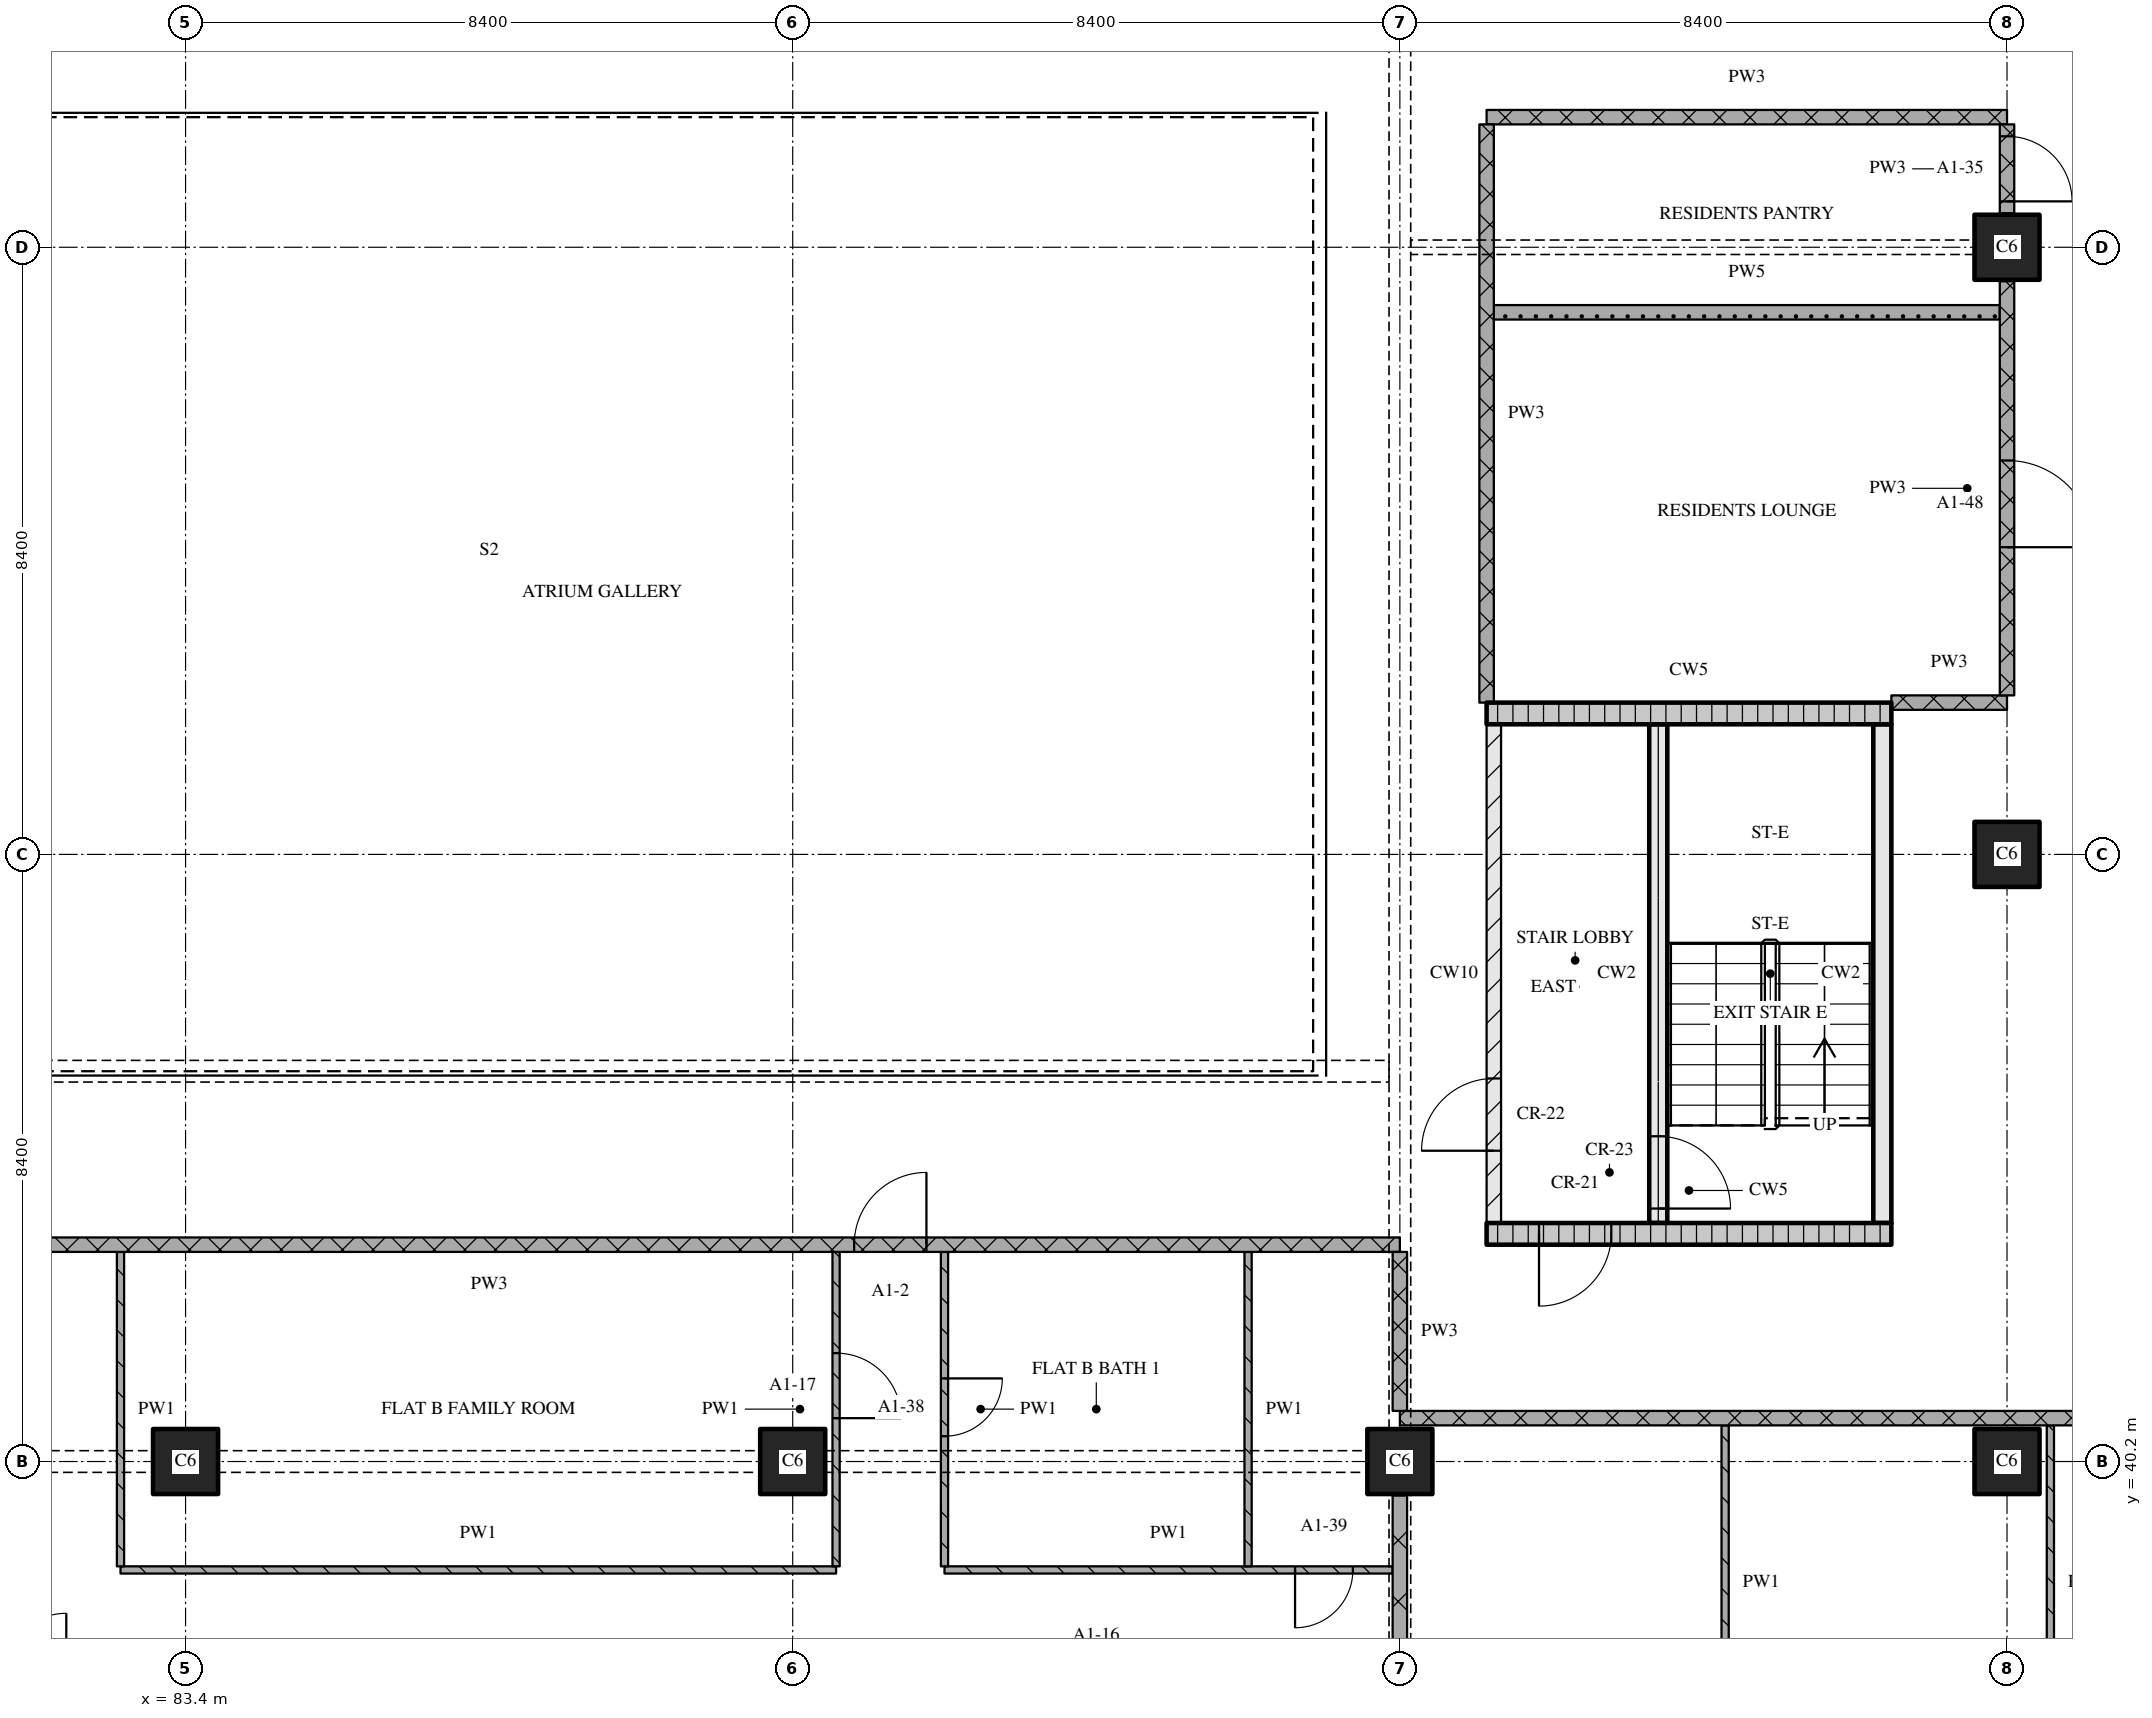
"""IFC4 building model, lengths in metres.
Left out: names, types, materials, properties, quantities, classifications, styles, units other than length and angle.
Written with IfcOpenShell. Run it as: python <this file> out.ifc"""

import sys

from ifc_helpers import new_model, si_unit, direction, frame, frame_2d, origin, origin_2d, place, context, subcontext, project, spatial, rectangle, extrude, element, fill, save


model = new_model("IFC4")
c1 = context("Model", 3, precision=1e-05, world=origin(), true_north=direction((0.0, 1.0)))
c2 = subcontext(c1, "Body", "Model", "MODEL_VIEW")
j1 = project(units=[si_unit("LENGTHUNIT", "METRE"), si_unit("PLANEANGLEUNIT", "RADIAN")], contexts=[c1])
p1 = place(None, origin())
s1 = spatial("IfcSite", under=j1, at=p1, CompositionType="ELEMENT")
p2 = place(p1, origin())
s2 = spatial("IfcBuilding", under=s1, at=p2, CompositionType="ELEMENT")
p3 = place(p2, frame((0.0, 0.0, 40.8)))
s3 = spatial("IfcBuildingStorey", under=s2, at=p3, CompositionType="ELEMENT", Elevation=40.8)
for number, where, z_axis, x_axis in (
    (1, (83.4, 40.2, 0.0), (0.0, 0.0, 1.0), (1.0, 0.0, 0.0)),
    (2, (91.8, 40.2, 0.0), (0.0, 0.0, 1.0), (1.0, 0.0, 0.0)),
    (3, (100.2, 40.2, 0.0), (0.0, 0.0, 1.0), (1.0, 0.0, 0.0)),
    (4, (108.6, 40.2, 0.0), (0.0, 0.0, 1.0), (1.0, 0.0, 0.0)),
    (5, (108.6, 48.6, 0.0), (0.0, 0.0, 1.0), (1.0, 0.0, 0.0)),
    (6, (108.6, 57.0, 0.0), (0.0, 0.0, 1.0), (1.0, 0.0, 0.0)),
):
    element("IfcColumn", number, at=place(p3, frame(where, z_axis=z_axis, x_axis=x_axis)), inside=s3, PredefinedType="COLUMN", context=c2, shape_type="SweptSolid", body=[
        extrude(rectangle(XDim=0.9, YDim=0.9, at=origin_2d()), origin(), (0.0, 0.0, 1.0), 3.6),
    ])
p4 = place(p3, frame((101.4, 43.35, 0.0), z_axis=(0.0, 0.0, 1.0), x_axis=(1.0, 0.0, 0.0)))
e7 = element("IfcWall", 7, at=p4, inside=s3, PredefinedType="SOLIDWALL", context=c2, shape_type="SweptSolid", body=[
    extrude(rectangle(XDim=5.6, YDim=0.3, at=frame_2d((2.8, 0.0))), origin(), (0.0, 0.0, 1.0), 3.32),
])
p5 = place(p4, frame((0.725, 0.0, 0.0)))
e8 = element("IfcOpeningElement", 8, at=p5, cuts=e7, PredefinedType="OPENING", context=c2, shape_type="SweptSolid", body=[
    extrude(rectangle(XDim=1.0, YDim=2.1, at=frame_2d((0.5, 1.05))), frame((0.0, 0.16, 0.0), z_axis=(0.0, -1.0, 0.0), x_axis=(1.0, 0.0, 0.0)), (0.0, 0.0, 1.0), 0.32),
])
p6 = place(p3, frame((101.5, 43.5, 0.0), z_axis=(0.0, 0.0, 1.0), x_axis=(0.0, 1.0, 0.0)))
e9 = element("IfcWall", 9, at=p6, inside=s3, PredefinedType="PARTITIONING", context=c2, shape_type="SweptSolid", body=[
    extrude(rectangle(XDim=6.9, YDim=0.2, at=frame_2d((3.45, 0.0))), origin(), (0.0, 0.0, 1.0), 3.32),
])
p7 = place(p6, frame((1.0, 0.0, 0.0)))
e10 = element("IfcOpeningElement", 10, at=p7, cuts=e9, PredefinedType="OPENING", context=c2, shape_type="SweptSolid", body=[
    extrude(rectangle(XDim=1.0, YDim=2.1, at=frame_2d((0.5, 1.05))), frame((0.0, 0.11, 0.0), z_axis=(0.0, -1.0, 0.0), x_axis=(1.0, 0.0, 0.0)), (0.0, 0.0, 1.0), 0.22),
])
p8 = place(p3, frame((103.775, 43.5, 0.0), z_axis=(0.0, 0.0, 1.0), x_axis=(0.0, 1.0, 0.0)))
e11 = element("IfcWall", 11, at=p8, inside=s3, PredefinedType="SOLIDWALL", context=c2, shape_type="SweptSolid", body=[
    extrude(rectangle(XDim=6.9, YDim=0.25, at=frame_2d((3.45, 0.0))), origin(), (0.0, 0.0, 1.0), 3.32),
])
p9 = place(p8, frame((0.2, 0.0, 0.0)))
e12 = element("IfcOpeningElement", 12, at=p9, cuts=e11, PredefinedType="OPENING", context=c2, shape_type="SweptSolid", body=[
    extrude(rectangle(XDim=1.0, YDim=2.1, at=frame_2d((0.5, 1.05))), frame((0.0, 0.135, 0.0), z_axis=(0.0, -1.0, 0.0), x_axis=(1.0, 0.0, 0.0)), (0.0, 0.0, 1.0), 0.27),
])
p10 = place(p3, frame((106.875, 43.5, 0.0), z_axis=(0.0, 0.0, 1.0), x_axis=(0.0, 1.0, 0.0)))
e13 = element("IfcWall", 13, at=p10, inside=s3, PredefinedType="SOLIDWALL", context=c2, shape_type="SweptSolid", body=[
    extrude(rectangle(XDim=6.9, YDim=0.25, at=frame_2d((3.45, 0.0))), origin(), (0.0, 0.0, 1.0), 3.32),
])
p11 = place(p3, frame((101.4, 50.55, 0.0), z_axis=(0.0, 0.0, 1.0), x_axis=(1.0, 0.0, 0.0)))
e14 = element("IfcWall", 14, at=p11, inside=s3, PredefinedType="SOLIDWALL", context=c2, shape_type="SweptSolid", body=[
    extrude(rectangle(XDim=5.6, YDim=0.3, at=frame_2d((2.8, 0.0))), origin(), (0.0, 0.0, 1.0), 3.32),
])
p12 = place(p3, frame((82.5, 38.7, 0.0), z_axis=(0.0, 0.0, 1.0), x_axis=(1.0, 0.0, 0.0)))
e15 = element("IfcWall", 15, at=p12, inside=s3, PredefinedType="PARTITIONING", context=c2, shape_type="SweptSolid", body=[
    extrude(rectangle(XDim=9.9, YDim=0.1, at=frame_2d((4.95, 0.0))), origin(), (0.0, 0.0, 1.0), 3.32),
])
p13 = place(p3, frame((93.9, 38.7, 0.0), z_axis=(0.0, 0.0, 1.0), x_axis=(1.0, 0.0, 0.0)))
e16 = element("IfcWall", 16, at=p13, inside=s3, PredefinedType="PARTITIONING", context=c2, shape_type="SweptSolid", body=[
    extrude(rectangle(XDim=6.2, YDim=0.1, at=frame_2d((3.1, 0.0))), origin(), (0.0, 0.0, 1.0), 3.32),
])
p14 = place(p13, frame((4.85, 0.0, 0.0)))
e17 = element("IfcOpeningElement", 17, at=p14, cuts=e16, PredefinedType="OPENING", context=c2, shape_type="SweptSolid", body=[
    extrude(rectangle(XDim=0.8, YDim=2.1, at=frame_2d((0.4, 1.05))), frame((0.0, 0.06, 0.0), z_axis=(0.0, -1.0, 0.0), x_axis=(1.0, 0.0, 0.0)), (0.0, 0.0, 1.0), 0.12),
])
p15 = place(p3, frame((124.28, 40.8, 0.0), z_axis=(0.0, 0.0, 1.0), x_axis=(-1.0, 0.0, 0.0)))
e18 = element("IfcWall", 18, at=p15, inside=s3, PredefinedType="PARTITIONING", context=c2, shape_type="SweptSolid", body=[
    extrude(rectangle(XDim=24.08, YDim=0.2, at=frame_2d((12.04, 0.0))), origin(), (0.0, 0.0, 1.0), 3.32),
])
p16 = place(p15, frame((11.73, 0.0, 0.0)))
e19 = element("IfcOpeningElement", 19, at=p16, cuts=e18, PredefinedType="OPENING", context=c2, shape_type="SweptSolid", body=[
    extrude(rectangle(XDim=1.0, YDim=2.1, at=frame_2d((0.5, 1.05))), frame((0.0, 0.11, 0.0), z_axis=(0.0, -1.0, 0.0), x_axis=(1.0, 0.0, 0.0)), (0.0, 0.0, 1.0), 0.22),
])
p17 = place(p3, frame((100.2, 43.2, 0.0), z_axis=(0.0, 0.0, 1.0), x_axis=(-1.0, 0.0, 0.0)))
e20 = element("IfcWall", 20, at=p17, inside=s3, PredefinedType="PARTITIONING", context=c2, shape_type="SweptSolid", body=[
    extrude(rectangle(XDim=25.2, YDim=0.2, at=frame_2d((12.6, 0.0))), origin(), (0.0, 0.0, 1.0), 3.32),
])
p18 = place(p17, frame((6.55, 0.0, 0.0)))
e21 = element("IfcOpeningElement", 21, at=p18, cuts=e20, PredefinedType="OPENING", context=c2, shape_type="SweptSolid", body=[
    extrude(rectangle(XDim=1.0, YDim=2.1, at=frame_2d((0.5, 1.05))), frame((0.0, 0.11, 0.0), z_axis=(0.0, -1.0, 0.0), x_axis=(1.0, 0.0, 0.0)), (0.0, 0.0, 1.0), 0.22),
])
p19 = place(p3, frame((107.0, 50.7, 0.0), z_axis=(0.0, 0.0, 1.0), x_axis=(1.0, 0.0, 0.0)))
e22 = element("IfcWall", 22, at=p19, inside=s3, PredefinedType="PARTITIONING", context=c2, shape_type="SweptSolid", body=[
    extrude(rectangle(XDim=1.6, YDim=0.2, at=frame_2d((0.8, 0.0))), origin(), (0.0, 0.0, 1.0), 3.32),
])
p20 = place(p3, frame((101.5, 56.1, 0.0), z_axis=(0.0, 0.0, 1.0), x_axis=(1.0, 0.0, 0.0)))
e23 = element("IfcWall", 23, at=p20, inside=s3, PredefinedType="PARTITIONING", context=c2, shape_type="SweptSolid", body=[
    extrude(rectangle(XDim=7.0, YDim=0.2, at=frame_2d((3.5, 0.0))), origin(), (0.0, 0.0, 1.0), 3.32),
])
p21 = place(p3, frame((101.4, 58.8, 0.0), z_axis=(0.0, 0.0, 1.0), x_axis=(1.0, 0.0, 0.0)))
e24 = element("IfcWall", 24, at=p21, inside=s3, PredefinedType="PARTITIONING", context=c2, shape_type="SweptSolid", body=[
    extrude(rectangle(XDim=7.2, YDim=0.2, at=frame_2d((3.6, 0.0))), origin(), (0.0, 0.0, 1.0), 3.32),
])
p22 = place(p3, frame((82.5, 43.1, 0.0), z_axis=(0.0, 0.0, 1.0), x_axis=(0.0, -1.0, 0.0)))
e25 = element("IfcWall", 25, at=p22, inside=s3, PredefinedType="PARTITIONING", context=c2, shape_type="SweptSolid", body=[
    extrude(rectangle(XDim=4.35, YDim=0.1, at=frame_2d((2.175, 0.0))), origin(), (0.0, 0.0, 1.0), 3.32),
])
p23 = place(p3, frame((92.4, 38.75, 0.0), z_axis=(0.0, 0.0, 1.0), x_axis=(0.0, 1.0, 0.0)))
e26 = element("IfcWall", 26, at=p23, inside=s3, PredefinedType="PARTITIONING", context=c2, shape_type="SweptSolid", body=[
    extrude(rectangle(XDim=4.35, YDim=0.1, at=frame_2d((2.175, 0.0))), origin(), (0.0, 0.0, 1.0), 3.32),
])
p24 = place(p23, frame((2.05, 0.0, 0.0)))
e27 = element("IfcOpeningElement", 27, at=p24, cuts=e26, PredefinedType="OPENING", context=c2, shape_type="SweptSolid", body=[
    extrude(rectangle(XDim=0.9, YDim=2.1, at=frame_2d((0.45, 1.05))), frame((0.0, 0.06, 0.0), z_axis=(0.0, -1.0, 0.0), x_axis=(1.0, 0.0, 0.0)), (0.0, 0.0, 1.0), 0.12),
])
p25 = place(p3, frame((93.9, 43.1, 0.0), z_axis=(0.0, 0.0, 1.0), x_axis=(0.0, -1.0, 0.0)))
e28 = element("IfcWall", 28, at=p25, inside=s3, PredefinedType="PARTITIONING", context=c2, shape_type="SweptSolid", body=[
    extrude(rectangle(XDim=4.35, YDim=0.1, at=frame_2d((2.175, 0.0))), origin(), (0.0, 0.0, 1.0), 3.32),
])
p26 = place(p25, frame((1.75, 0.0, 0.0)))
e29 = element("IfcOpeningElement", 29, at=p26, cuts=e28, PredefinedType="OPENING", context=c2, shape_type="SweptSolid", body=[
    extrude(rectangle(XDim=0.8, YDim=2.1, at=frame_2d((0.4, 1.05))), frame((0.0, 0.06, 0.0), z_axis=(0.0, -1.0, 0.0), x_axis=(1.0, 0.0, 0.0)), (0.0, 0.0, 1.0), 0.12),
])
p27 = place(p3, frame((98.1, 43.1, 0.0), z_axis=(0.0, 0.0, 1.0), x_axis=(0.0, -1.0, 0.0)))
e30 = element("IfcWall", 30, at=p27, inside=s3, PredefinedType="PARTITIONING", context=c2, shape_type="SweptSolid", body=[
    extrude(rectangle(XDim=4.35, YDim=0.1, at=frame_2d((2.175, 0.0))), origin(), (0.0, 0.0, 1.0), 3.32),
])
p28 = place(p3, frame((100.2, 43.1, 0.0), z_axis=(0.0, 0.0, 1.0), x_axis=(0.0, -1.0, 0.0)))
e31 = element("IfcWall", 31, at=p28, inside=s3, PredefinedType="PARTITIONING", context=c2, shape_type="SweptSolid", body=[
    extrude(rectangle(XDim=2.2, YDim=0.2, at=frame_2d((1.1, 0.0))), origin(), (0.0, 0.0, 1.0), 2.43),
])
p29 = place(p3, frame((100.2, 39.73, 0.0), z_axis=(0.0, 0.0, 1.0), x_axis=(0.0, -1.0, 0.0)))
e32 = element("IfcWall", 32, at=p29, inside=s3, PredefinedType="PARTITIONING", context=c2, shape_type="SweptSolid", body=[
    extrude(rectangle(XDim=7.46, YDim=0.2, at=frame_2d((3.73, 0.0))), origin(), (0.0, 0.0, 1.0), 2.83),
])
p30 = place(p3, frame((101.4, 58.7, 0.0), z_axis=(0.0, 0.0, 1.0), x_axis=(0.0, -1.0, 0.0)))
e33 = element("IfcWall", 33, at=p30, inside=s3, PredefinedType="PARTITIONING", context=c2, shape_type="SweptSolid", body=[
    extrude(rectangle(XDim=8.0, YDim=0.2, at=frame_2d((4.0, 0.0))), origin(), (0.0, 0.0, 1.0), 3.32),
])
p31 = place(p3, frame((104.7, 40.7, 0.0), z_axis=(0.0, 0.0, 1.0), x_axis=(0.0, -1.0, 0.0)))
e34 = element("IfcWall", 34, at=p31, inside=s3, PredefinedType="PARTITIONING", context=c2, shape_type="SweptSolid", body=[
    extrude(rectangle(XDim=4.35, YDim=0.1, at=frame_2d((2.175, 0.0))), origin(), (0.0, 0.0, 1.0), 3.32),
])
p32 = place(p3, frame((108.6, 50.8, 0.0), z_axis=(0.0, 0.0, 1.0), x_axis=(0.0, 1.0, 0.0)))
e35 = element("IfcWall", 35, at=p32, inside=s3, PredefinedType="PARTITIONING", context=c2, shape_type="SweptSolid", body=[
    extrude(rectangle(XDim=5.73, YDim=0.2, at=frame_2d((2.865, 0.0))), origin(), (0.0, 0.0, 1.0), 3.32),
])
p33 = place(p32, frame((2.05, 0.0, 0.0)))
e36 = element("IfcOpeningElement", 36, at=p33, cuts=e35, PredefinedType="OPENING", context=c2, shape_type="SweptSolid", body=[
    extrude(rectangle(XDim=1.2, YDim=2.1, at=frame_2d((0.6, 1.05))), frame((0.0, 0.11, 0.0), z_axis=(0.0, -1.0, 0.0), x_axis=(1.0, 0.0, 0.0)), (0.0, 0.0, 1.0), 0.22),
])
p34 = place(p3, frame((108.6, 57.47, 0.0), z_axis=(0.0, 0.0, 1.0), x_axis=(0.0, 1.0, 0.0)))
e37 = element("IfcWall", 37, at=p34, inside=s3, PredefinedType="PARTITIONING", context=c2, shape_type="SweptSolid", body=[
    extrude(rectangle(XDim=1.23, YDim=0.2, at=frame_2d((0.615, 0.0))), origin(), (0.0, 0.0, 1.0), 3.32),
])
p35 = place(p34, frame((0.165, 0.0, 0.0)))
e38 = element("IfcOpeningElement", 38, at=p35, cuts=e37, PredefinedType="OPENING", context=c2, shape_type="SweptSolid", body=[
    extrude(rectangle(XDim=0.9, YDim=2.1, at=frame_2d((0.45, 1.05))), frame((0.0, 0.11, 0.0), z_axis=(0.0, -1.0, 0.0), x_axis=(1.0, 0.0, 0.0)), (0.0, 0.0, 1.0), 0.22),
])
p36 = place(p3, frame((109.2, 40.7, 0.0), z_axis=(0.0, 0.0, 1.0), x_axis=(0.0, -1.0, 0.0)))
e39 = element("IfcWall", 39, at=p36, inside=s3, PredefinedType="PARTITIONING", context=c2, shape_type="SweptSolid", body=[
    extrude(rectangle(XDim=4.35, YDim=0.1, at=frame_2d((2.175, 0.0))), origin(), (0.0, 0.0, 1.0), 3.32),
])
p37 = place(p5, origin())
e40 = element("IfcDoor", 40, at=p37, inside=s3, OperationType="SINGLE_SWING_RIGHT", PredefinedType="DOOR", context=c2, shape_type="SweptSolid", body=[
    extrude(rectangle(XDim=1.0, YDim=2.1, at=frame_2d((0.5, 1.05))), frame((0.0, 0.025, 0.0), z_axis=(0.0, -1.0, 0.0), x_axis=(1.0, 0.0, 0.0)), (0.0, 0.0, 1.0), 0.05),
])
fill(e8, e40)
p38 = place(p9, origin())
e41 = element("IfcDoor", 41, at=p38, inside=s3, OperationType="SINGLE_SWING_RIGHT", PredefinedType="DOOR", context=c2, shape_type="SweptSolid", body=[
    extrude(rectangle(XDim=1.0, YDim=2.1, at=frame_2d((0.5, 1.05))), frame((0.0, 0.025, 0.0), z_axis=(0.0, -1.0, 0.0), x_axis=(1.0, 0.0, 0.0)), (0.0, 0.0, 1.0), 0.05),
])
fill(e12, e41)
p39 = place(p7, origin())
e42 = element("IfcDoor", 42, at=p39, inside=s3, OperationType="SINGLE_SWING_LEFT", PredefinedType="DOOR", context=c2, shape_type="SweptSolid", body=[
    extrude(rectangle(XDim=1.0, YDim=2.1, at=frame_2d((0.5, 1.05))), frame((0.0, 0.025, 0.0), z_axis=(0.0, -1.0, 0.0), x_axis=(1.0, 0.0, 0.0)), (0.0, 0.0, 1.0), 0.05),
])
fill(e10, e42)
p40 = place(p14, origin())
e43 = element("IfcDoor", 43, at=p40, inside=s3, OperationType="SINGLE_SWING_RIGHT", PredefinedType="DOOR", context=c2, shape_type="SweptSolid", body=[
    extrude(rectangle(XDim=0.8, YDim=2.1, at=frame_2d((0.4, 1.05))), frame((0.0, 0.025, 0.0), z_axis=(0.0, -1.0, 0.0), x_axis=(1.0, 0.0, 0.0)), (0.0, 0.0, 1.0), 0.05),
])
fill(e17, e43)
p41 = place(p18, origin())
e44 = element("IfcDoor", 44, at=p41, inside=s3, OperationType="SINGLE_SWING_RIGHT", PredefinedType="DOOR", context=c2, shape_type="SweptSolid", body=[
    extrude(rectangle(XDim=1.0, YDim=2.1, at=frame_2d((0.5, 1.05))), frame((0.0, 0.025, 0.0), z_axis=(0.0, -1.0, 0.0), x_axis=(1.0, 0.0, 0.0)), (0.0, 0.0, 1.0), 0.05),
])
fill(e21, e44)
p42 = place(p24, origin())
e45 = element("IfcDoor", 45, at=p42, inside=s3, OperationType="SINGLE_SWING_RIGHT", PredefinedType="DOOR", context=c2, shape_type="SweptSolid", body=[
    extrude(rectangle(XDim=0.9, YDim=2.1, at=frame_2d((0.45, 1.05))), frame((0.0, 0.025, 0.0), z_axis=(0.0, -1.0, 0.0), x_axis=(1.0, 0.0, 0.0)), (0.0, 0.0, 1.0), 0.05),
])
fill(e27, e45)
p43 = place(p26, origin())
e46 = element("IfcDoor", 46, at=p43, inside=s3, OperationType="SINGLE_SWING_LEFT", PredefinedType="DOOR", context=c2, shape_type="SweptSolid", body=[
    extrude(rectangle(XDim=0.8, YDim=2.1, at=frame_2d((0.4, 1.05))), frame((0.0, 0.025, 0.0), z_axis=(0.0, -1.0, 0.0), x_axis=(1.0, 0.0, 0.0)), (0.0, 0.0, 1.0), 0.05),
])
fill(e29, e46)
p44 = place(p33, origin())
e47 = element("IfcDoor", 47, at=p44, inside=s3, OperationType="SINGLE_SWING_RIGHT", PredefinedType="DOOR", context=c2, shape_type="SweptSolid", body=[
    extrude(rectangle(XDim=1.2, YDim=2.1, at=frame_2d((0.6, 1.05))), frame((0.0, 0.025, 0.0), z_axis=(0.0, -1.0, 0.0), x_axis=(1.0, 0.0, 0.0)), (0.0, 0.0, 1.0), 0.05),
])
fill(e36, e47)
p45 = place(p35, origin())
e48 = element("IfcDoor", 48, at=p45, inside=s3, OperationType="SINGLE_SWING_RIGHT", PredefinedType="DOOR", context=c2, shape_type="SweptSolid", body=[
    extrude(rectangle(XDim=0.9, YDim=2.1, at=frame_2d((0.45, 1.05))), frame((0.0, 0.025, 0.0), z_axis=(0.0, -1.0, 0.0), x_axis=(1.0, 0.0, 0.0)), (0.0, 0.0, 1.0), 0.05),
])
fill(e38, e48)
save(model, sys.argv[1])
